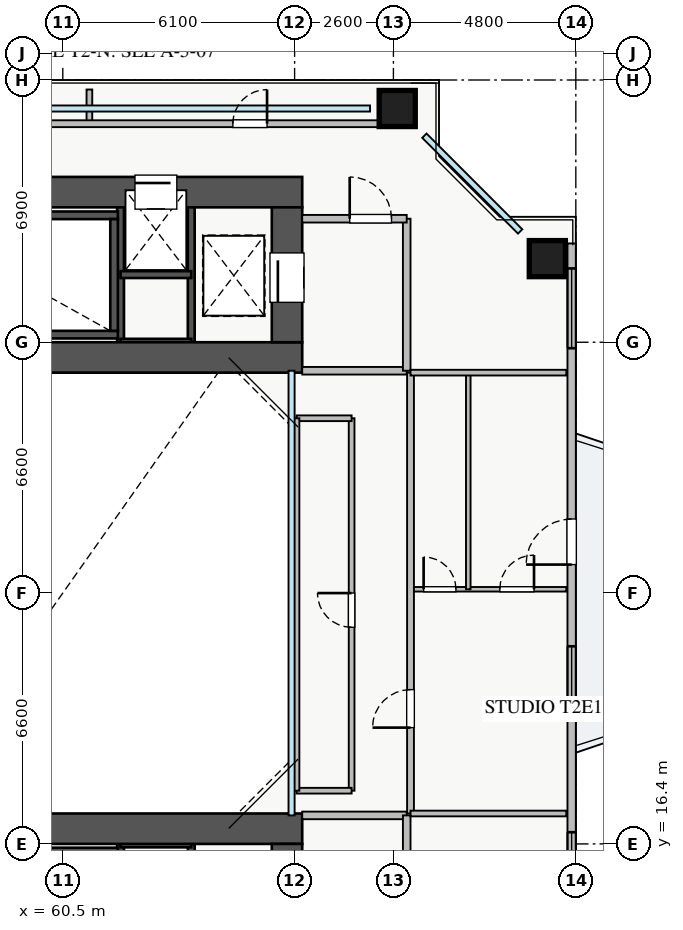
"""IFC4 building model, lengths in metres.
Left out: names, types, materials, properties, quantities, classifications, styles, units other than length and angle.
Written with IfcOpenShell. Run it as: python <this file> out.ifc"""

import sys

from ifc_helpers import new_model, si_unit, direction, frame, frame_2d, origin, origin_2d, place, context, subcontext, project, spatial, rectangle, extrude, source, transform, mapped, element, fill, save


model = new_model("IFC4")
c1 = context("Model", 3, precision=1e-05, world=origin(), true_north=direction((0.0, 1.0)))
c2 = subcontext(c1, "Body", "Model", "MODEL_VIEW")
j1 = project(units=[si_unit("LENGTHUNIT", "METRE"), si_unit("PLANEANGLEUNIT", "RADIAN")], contexts=[c1])
p1 = place(None, origin())
s1 = spatial("IfcSite", under=j1, at=p1, CompositionType="ELEMENT")
p2 = place(p1, origin())
s2 = spatial("IfcBuilding", under=s1, at=p2, CompositionType="ELEMENT")
p3 = place(p2, frame((0.0, 0.0, 26.25)))
s3 = spatial("IfcBuildingStorey", under=s2, at=p3, CompositionType="ELEMENT", Elevation=26.25)
for number, where, z_axis, x_axis in (
    (1, (62.02, 29.6, 0.0), (0.0, 0.0, 1.0), (0.0, 1.0, 0.0)),
    (2, (63.88, 29.6, 0.0), (0.0, 0.0, 1.0), (0.0, 1.0, 0.0)),
):
    element("IfcWall", number, at=place(p3, frame(where, z_axis=z_axis, x_axis=x_axis)), inside=s3, PredefinedType="SHEAR", context=c2, shape_type="SweptSolid", body=[
        extrude(rectangle(XDim=3.95, YDim=0.18, at=frame_2d((1.975, 0.0))), origin(), (0.0, 0.0, 1.0), 3.07),
    ])
for number, where, z_axis, x_axis in (
    (3, (62.02, 31.38, 0.0), (0.0, 0.0, 1.0), (1.0, 0.0, 0.0)),
    (4, (62.02, 29.6, 0.0), (0.0, 0.0, 1.0), (1.0, 0.0, 0.0)),
):
    element("IfcWall", number, at=place(p3, frame(where, z_axis=z_axis, x_axis=x_axis)), inside=s3, PredefinedType="SHEAR", context=c2, shape_type="SweptSolid", body=[
        extrude(rectangle(XDim=1.86, YDim=0.18, at=frame_2d((0.93, 0.0))), origin(), (0.0, 0.0, 1.0), 3.07),
    ])
for number, where, z_axis, x_axis in (
    (5, (62.02, 12.45, 0.0), (0.0, 0.0, 1.0), (0.0, 1.0, 0.0)),
    (6, (63.88, 12.45, 0.0), (0.0, 0.0, 1.0), (0.0, 1.0, 0.0)),
):
    element("IfcWall", number, at=place(p3, frame(where, z_axis=z_axis, x_axis=x_axis)), inside=s3, PredefinedType="SHEAR", context=c2, shape_type="SweptSolid", body=[
        extrude(rectangle(XDim=3.95, YDim=0.18, at=frame_2d((1.975, 0.0))), origin(), (0.0, 0.0, 1.0), 3.07),
    ])
p4 = place(p3, frame((62.02, 16.4, 0.0), z_axis=(0.0, 0.0, 1.0), x_axis=(1.0, 0.0, 0.0)))
e7 = element("IfcWall", 7, at=p4, inside=s3, PredefinedType="SHEAR", context=c2, shape_type="SweptSolid", body=[
    extrude(rectangle(XDim=1.86, YDim=0.18, at=frame_2d((0.93, 0.0))), origin(), (0.0, 0.0, 1.0), 3.07),
])
for number, where, z_axis, x_axis in (
    (8, (54.8, 29.8, 0.0), (0.0, 0.0, 1.0), (1.0, 0.0, 0.0)),
    (9, (54.8, 32.94, 0.0), (0.0, 0.0, 1.0), (1.0, 0.0, 0.0)),
):
    element("IfcWall", number, at=place(p3, frame(where, z_axis=z_axis, x_axis=x_axis)), inside=s3, PredefinedType="SHEAR", context=c2, shape_type="SweptSolid", body=[
        extrude(rectangle(XDim=7.15, YDim=0.2, at=frame_2d((3.575, 0.0))), origin(), (0.0, 0.0, 1.0), 3.25),
    ])
p5 = place(p3, frame((61.85, 29.9, 0.0), z_axis=(0.0, 0.0, 1.0), x_axis=(0.0, 1.0, 0.0)))
e10 = element("IfcWall", 10, at=p5, inside=s3, PredefinedType="SHEAR", context=c2, shape_type="SweptSolid", body=[
    extrude(rectangle(XDim=2.94, YDim=0.2, at=frame_2d((1.47, 0.0))), origin(), (0.0, 0.0, 1.0), 3.25),
])
p6 = place(p3, frame((54.8, 16.2, 0.0), z_axis=(0.0, 0.0, 1.0), x_axis=(1.0, 0.0, 0.0)))
e11 = element("IfcWall", 11, at=p6, inside=s3, PredefinedType="SHEAR", context=c2, shape_type="SweptSolid", body=[
    extrude(rectangle(XDim=7.15, YDim=0.2, at=frame_2d((3.575, 0.0))), origin(), (0.0, 0.0, 1.0), 3.25),
])
p7 = place(p3, frame((54.2, 29.2, 0.0), z_axis=(0.0, 0.0, 1.0), x_axis=(1.0, 0.0, 0.0)))
e12 = element("IfcWall", 12, at=p7, inside=s3, PredefinedType="SHEAR", context=c2, shape_type="SweptSolid", body=[
    extrude(rectangle(XDim=12.6, YDim=0.8, at=frame_2d((6.3, 0.0))), origin(), (0.0, 0.0, 1.0), 3.25),
])
p8 = place(p3, frame((54.2, 33.55, 0.0), z_axis=(0.0, 0.0, 1.0), x_axis=(1.0, 0.0, 0.0)))
e13 = element("IfcWall", 13, at=p8, inside=s3, PredefinedType="SHEAR", context=c2, shape_type="SweptSolid", body=[
    extrude(rectangle(XDim=12.6, YDim=0.8, at=frame_2d((6.3, 0.0))), origin(), (0.0, 0.0, 1.0), 3.25),
])
p9 = place(p8, frame((8.2, 0.0, 0.0)))
e14 = element("IfcOpeningElement", 14, at=p9, cuts=e13, PredefinedType="OPENING", context=c2, shape_type="SweptSolid", body=[
    extrude(rectangle(XDim=1.1, YDim=2.05, at=frame_2d((0.55, 1.025))), frame((0.0, 0.41, 0.0), z_axis=(0.0, -1.0, 0.0), x_axis=(1.0, 0.0, 0.0)), (0.0, 0.0, 1.0), 0.82),
])
p10 = place(p3, frame((66.4, 29.6, 0.0), z_axis=(0.0, 0.0, 1.0), x_axis=(0.0, 1.0, 0.0)))
e15 = element("IfcWall", 15, at=p10, inside=s3, PredefinedType="SHEAR", context=c2, shape_type="SweptSolid", body=[
    extrude(rectangle(XDim=3.55, YDim=0.8, at=frame_2d((1.775, 0.0))), origin(), (0.0, 0.0, 1.0), 3.25),
])
p11 = place(p10, frame((1.05, 0.0, 0.0)))
e16 = element("IfcOpeningElement", 16, at=p11, cuts=e15, PredefinedType="OPENING", context=c2, shape_type="SweptSolid", body=[
    extrude(rectangle(XDim=1.3, YDim=2.05, at=frame_2d((0.65, 1.025))), frame((0.0, 0.41, 0.0), z_axis=(0.0, -1.0, 0.0), x_axis=(1.0, 0.0, 0.0)), (0.0, 0.0, 1.0), 0.82),
])
p12 = place(p3, frame((54.2, 16.8, 0.0), z_axis=(0.0, 0.0, 1.0), x_axis=(1.0, 0.0, 0.0)))
e17 = element("IfcWall", 17, at=p12, inside=s3, PredefinedType="SHEAR", context=c2, shape_type="SweptSolid", body=[
    extrude(rectangle(XDim=12.6, YDim=0.8, at=frame_2d((6.3, 0.0))), origin(), (0.0, 0.0, 1.0), 3.25),
])
p13 = place(p3, frame((66.4, 12.85, 0.0), z_axis=(0.0, 0.0, 1.0), x_axis=(0.0, 1.0, 0.0)))
e18 = element("IfcWall", 18, at=p13, inside=s3, PredefinedType="SHEAR", context=c2, shape_type="SweptSolid", body=[
    extrude(rectangle(XDim=3.55, YDim=0.8, at=frame_2d((1.775, 0.0))), origin(), (0.0, 0.0, 1.0), 3.25),
])
p14 = place(p13, frame((1.05, 0.0, 0.0)))
e19 = element("IfcOpeningElement", 19, at=p14, cuts=e18, PredefinedType="OPENING", context=c2, shape_type="SweptSolid", body=[
    extrude(rectangle(XDim=1.3, YDim=2.05, at=frame_2d((0.65, 1.025))), frame((0.0, 0.41, 0.0), z_axis=(0.0, -1.0, 0.0), x_axis=(1.0, 0.0, 0.0)), (0.0, 0.0, 1.0), 0.82),
])
m1 = source(origin(), c2, "Body", "SweptSolid", [
    extrude(rectangle(XDim=0.95, YDim=0.95, at=origin_2d()), origin(), (0.0, 0.0, 1.0), 3.25),
])
for number, where, z_axis, x_axis in (
    (20, (73.25, 31.8, 0.0), (0.0, 0.0, 1.0), (1.0, 0.0, 0.0)),
    (21, (69.3, 35.75, 0.0), (0.0, 0.0, 1.0), (1.0, 0.0, 0.0)),
):
    element("IfcColumn", number, at=place(p3, frame(where, z_axis=z_axis, x_axis=x_axis)), inside=s3, PredefinedType="COLUMN", context=c2, shape_type="MappedRepresentation", body=[
        mapped(m1, transform((0.0, 0.0, 0.0), x_axis=(1.0, 0.0, 0.0), y_axis=(0.0, 1.0, 0.0), z_axis=(0.0, 0.0, 1.0), scale=1.0)),
    ])
p15 = place(p3, frame((73.89, 13.8, 0.0), z_axis=(0.0, 0.0, 1.0), x_axis=(0.0, 1.0, 0.0)))
e22 = element("IfcWall", 22, at=p15, inside=s3, PredefinedType="STANDARD", context=c2, shape_type="SweptSolid", body=[
    extrude(rectangle(XDim=18.4, YDim=0.22, at=frame_2d((9.2, 0.0))), origin(), (0.0, 0.0, 1.0), 2.61),
])
p16 = place(p15, frame((9.95, 0.0, 0.0)))
e23 = element("IfcOpeningElement", 23, at=p16, cuts=e22, PredefinedType="OPENING", context=c2, shape_type="SweptSolid", body=[
    extrude(rectangle(XDim=1.2, YDim=2.1, at=frame_2d((0.6, 1.05))), frame((0.0, 0.12, 0.0), z_axis=(0.0, -1.0, 0.0), x_axis=(1.0, 0.0, 0.0)), (0.0, 0.0, 1.0), 0.24),
])
p17 = place(p15, frame((0.508, 0.0, 0.9)))
e24 = element("IfcOpeningElement", 24, at=p17, cuts=e22, PredefinedType="OPENING", context=c2, shape_type="SweptSolid", body=[
    extrude(rectangle(XDim=2.4, YDim=1.5, at=frame_2d((1.2, 0.75))), frame((0.0, 0.12, 0.0), z_axis=(0.0, -1.0, 0.0), x_axis=(1.0, 0.0, 0.0)), (0.0, 0.0, 1.0), 0.24),
])
p18 = place(p15, frame((6.0, 0.0, 0.9)))
e25 = element("IfcOpeningElement", 25, at=p18, cuts=e22, PredefinedType="OPENING", context=c2, shape_type="SweptSolid", body=[
    extrude(rectangle(XDim=1.8, YDim=1.45, at=frame_2d((0.9, 0.725))), frame((0.0, 0.12, 0.0), z_axis=(0.0, -1.0, 0.0), x_axis=(1.0, 0.0, 0.0)), (0.0, 0.0, 1.0), 0.24),
])
p19 = place(p15, frame((15.643, 0.0, 0.9)))
e26 = element("IfcOpeningElement", 26, at=p19, cuts=e22, PredefinedType="OPENING", context=c2, shape_type="SweptSolid", body=[
    extrude(rectangle(XDim=2.1, YDim=1.5, at=frame_2d((1.05, 0.75))), frame((0.0, 0.12, 0.0), z_axis=(0.0, -1.0, 0.0), x_axis=(1.0, 0.0, 0.0)), (0.0, 0.0, 1.0), 0.24),
])
p20 = place(p3, frame((66.8, 28.85, 0.0), z_axis=(0.0, 0.0, 1.0), x_axis=(1.0, 0.0, 0.0)))
e27 = element("IfcWall", 27, at=p20, inside=s3, PredefinedType="PARTITIONING", context=c2, shape_type="SweptSolid", body=[
    extrude(rectangle(XDim=2.75, YDim=0.2, at=frame_2d((1.375, 0.0))), origin(), (0.0, 0.0, 1.0), 3.07),
])
p21 = place(p3, frame((69.55, 28.85, 0.0), z_axis=(0.0, 0.0, 1.0), x_axis=(0.0, 1.0, 0.0)))
e28 = element("IfcWall", 28, at=p21, inside=s3, PredefinedType="PARTITIONING", context=c2, shape_type="SweptSolid", body=[
    extrude(rectangle(XDim=4.0, YDim=0.2, at=frame_2d((2.0, 0.0))), origin(), (0.0, 0.0, 1.0), 2.615),
])
p22 = place(p3, frame((66.8, 32.85, 0.0), z_axis=(0.0, 0.0, 1.0), x_axis=(1.0, 0.0, 0.0)))
e29 = element("IfcWall", 29, at=p22, inside=s3, PredefinedType="PARTITIONING", context=c2, shape_type="SweptSolid", body=[
    extrude(rectangle(XDim=2.75, YDim=0.2, at=frame_2d((1.375, 0.0))), origin(), (0.0, 0.0, 1.0), 3.07),
])
p23 = place(p22, frame((1.25, 0.0, 0.0)))
e30 = element("IfcOpeningElement", 30, at=p23, cuts=e29, PredefinedType="OPENING", context=c2, shape_type="SweptSolid", body=[
    extrude(rectangle(XDim=1.1, YDim=2.05, at=frame_2d((0.55, 1.025))), frame((0.0, 0.11, 0.0), z_axis=(0.0, -1.0, 0.0), x_axis=(1.0, 0.0, 0.0)), (0.0, 0.0, 1.0), 0.22),
])
p24 = place(p3, frame((66.8, 17.15, 0.0), z_axis=(0.0, 0.0, 1.0), x_axis=(1.0, 0.0, 0.0)))
e31 = element("IfcWall", 31, at=p24, inside=s3, PredefinedType="PARTITIONING", context=c2, shape_type="SweptSolid", body=[
    extrude(rectangle(XDim=2.75, YDim=0.2, at=frame_2d((1.375, 0.0))), origin(), (0.0, 0.0, 1.0), 3.07),
])
p25 = place(p3, frame((69.55, 13.15, 0.0), z_axis=(0.0, 0.0, 1.0), x_axis=(0.0, 1.0, 0.0)))
e32 = element("IfcWall", 32, at=p25, inside=s3, PredefinedType="PARTITIONING", context=c2, shape_type="SweptSolid", body=[
    extrude(rectangle(XDim=4.0, YDim=0.2, at=frame_2d((2.0, 0.0))), origin(), (0.0, 0.0, 1.0), 2.615),
])
p26 = place(p3, frame((69.65, 23.1, 0.0), z_axis=(0.0, 0.0, 1.0), x_axis=(1.0, 0.0, 0.0)))
e33 = element("IfcWall", 33, at=p26, inside=s3, PredefinedType="PLUMBINGWALL", context=c2, shape_type="SweptSolid", body=[
    extrude(rectangle(XDim=4.1, YDim=0.12, at=frame_2d((2.05, 0.0))), origin(), (0.0, 0.0, 1.0), 2.815),
])
p27 = place(p26, frame((0.345, 0.0, 0.0)))
e34 = element("IfcOpeningElement", 34, at=p27, cuts=e33, PredefinedType="OPENING", context=c2, shape_type="SweptSolid", body=[
    extrude(rectangle(XDim=0.85, YDim=2.05, at=frame_2d((0.425, 1.025))), frame((0.0, 0.07, 0.0), z_axis=(0.0, -1.0, 0.0), x_axis=(1.0, 0.0, 0.0)), (0.0, 0.0, 1.0), 0.14),
])
p28 = place(p26, frame((2.35, 0.0, 0.0)))
e35 = element("IfcOpeningElement", 35, at=p28, cuts=e33, PredefinedType="OPENING", context=c2, shape_type="SweptSolid", body=[
    extrude(rectangle(XDim=0.9, YDim=2.05, at=frame_2d((0.45, 1.025))), frame((0.0, 0.07, 0.0), z_axis=(0.0, -1.0, 0.0), x_axis=(1.0, 0.0, 0.0)), (0.0, 0.0, 1.0), 0.14),
])
p29 = place(p3, frame((71.17, 23.1, 0.0), z_axis=(0.0, 0.0, 1.0), x_axis=(0.0, 1.0, 0.0)))
e36 = element("IfcWall", 36, at=p29, inside=s3, PredefinedType="PLUMBINGWALL", context=c2, shape_type="SweptSolid", body=[
    extrude(rectangle(XDim=5.7, YDim=0.12, at=frame_2d((2.85, 0.0))), origin(), (0.0, 0.0, 1.0), 3.07),
])
p30 = place(p3, frame((69.65, 17.2, 0.0), z_axis=(0.0, 0.0, 1.0), x_axis=(0.0, 1.0, 0.0)))
e37 = element("IfcWall", 37, at=p30, inside=s3, PredefinedType="PARTITIONING", context=c2, shape_type="SweptSolid", body=[
    extrude(rectangle(XDim=11.6, YDim=0.18, at=frame_2d((5.8, 0.0))), origin(), (0.0, 0.0, 1.0), 3.07),
])
p31 = place(p30, frame((2.26, 0.0, 0.0)))
e38 = element("IfcOpeningElement", 38, at=p31, cuts=e37, PredefinedType="OPENING", context=c2, shape_type="SweptSolid", body=[
    extrude(rectangle(XDim=1.0, YDim=2.05, at=frame_2d((0.5, 1.025))), frame((0.0, 0.1, 0.0), z_axis=(0.0, -1.0, 0.0), x_axis=(1.0, 0.0, 0.0)), (0.0, 0.0, 1.0), 0.2),
])
for number, where, z_axis, x_axis in (
    (39, (69.65, 17.2, 0.0), (0.0, 0.0, 1.0), (1.0, 0.0, 0.0)),
    (40, (69.65, 28.8, 0.0), (0.0, 0.0, 1.0), (1.0, 0.0, 0.0)),
):
    element("IfcWall", number, at=place(p3, frame(where, z_axis=z_axis, x_axis=x_axis)), inside=s3, PredefinedType="PARTITIONING", context=c2, shape_type="SweptSolid", body=[
        extrude(rectangle(XDim=4.1, YDim=0.15, at=frame_2d((2.05, 0.0))), origin(), (0.0, 0.0, 1.0), 3.07),
    ])
p32 = place(p3, frame((68.1, 17.8, 0.0), z_axis=(0.0, 0.0, 1.0), x_axis=(0.0, 1.0, 0.0)))
e41 = element("IfcWall", 41, at=p32, inside=s3, PredefinedType="PARTITIONING", context=c2, shape_type="SweptSolid", body=[
    extrude(rectangle(XDim=9.8, YDim=0.15, at=frame_2d((4.9, 0.0))), origin(), (0.0, 0.0, 1.0), 3.07),
])
p33 = place(p32, frame((4.3, 0.0, 0.0)))
e42 = element("IfcOpeningElement", 42, at=p33, cuts=e41, PredefinedType="OPENING", context=c2, shape_type="SweptSolid", body=[
    extrude(rectangle(XDim=0.9, YDim=2.05, at=frame_2d((0.45, 1.025))), frame((0.0, 0.085, 0.0), z_axis=(0.0, -1.0, 0.0), x_axis=(1.0, 0.0, 0.0)), (0.0, 0.0, 1.0), 0.17),
])
p34 = place(p3, frame((66.65, 27.6, 0.0), z_axis=(0.0, 0.0, 1.0), x_axis=(1.0, 0.0, 0.0)))
e43 = element("IfcWall", 43, at=p34, inside=s3, PredefinedType="PARTITIONING", context=c2, shape_type="SweptSolid", body=[
    extrude(rectangle(XDim=1.45, YDim=0.15, at=frame_2d((0.725, 0.0))), origin(), (0.0, 0.0, 1.0), 2.815),
])
p35 = place(p3, frame((66.65, 17.8, 0.0), z_axis=(0.0, 0.0, 1.0), x_axis=(1.0, 0.0, 0.0)))
e44 = element("IfcWall", 44, at=p35, inside=s3, PredefinedType="PARTITIONING", context=c2, shape_type="SweptSolid", body=[
    extrude(rectangle(XDim=1.45, YDim=0.15, at=frame_2d((0.725, 0.0))), origin(), (0.0, 0.0, 1.0), 3.07),
])
p36 = place(p3, frame((66.65, 17.8, 0.0), z_axis=(0.0, 0.0, 1.0), x_axis=(0.0, 1.0, 0.0)))
e45 = element("IfcWall", 45, at=p36, inside=s3, PredefinedType="PARTITIONING", context=c2, shape_type="SweptSolid", body=[
    extrude(rectangle(XDim=9.8, YDim=0.15, at=frame_2d((4.9, 0.0))), origin(), (0.0, 0.0, 1.0), 2.665),
])
for number, where, z_axis, x_axis in (
    (46, (61.2, 35.35, 0.0), (0.0, 0.0, 1.0), (0.0, 1.0, 0.0)),
    (47, (69.65, 35.35, 0.0), (0.0, 0.0, 1.0), (0.0, 1.0, 0.0)),
):
    element("IfcWall", number, at=place(p3, frame(where, z_axis=z_axis, x_axis=x_axis)), inside=s3, PredefinedType="PARTITIONING", context=c2, shape_type="SweptSolid", body=[
        extrude(rectangle(XDim=0.9, YDim=0.15, at=frame_2d((0.45, 0.0))), origin(), (0.0, 0.0, 1.0), 3.07),
    ])
p37 = place(p3, frame((52.65, 35.35, 0.0), z_axis=(0.0, 0.0, 1.0), x_axis=(1.0, 0.0, 0.0)))
e48 = element("IfcWall", 48, at=p37, inside=s3, PredefinedType="PARTITIONING", context=c2, shape_type="SweptSolid", body=[
    extrude(rectangle(XDim=17.0, YDim=0.18, at=frame_2d((8.5, 0.0))), origin(), (0.0, 0.0, 1.0), 3.07),
])
p38 = place(p37, frame((3.825, 0.0, 0.0)))
e49 = element("IfcOpeningElement", 49, at=p38, cuts=e48, PredefinedType="OPENING", context=c2, shape_type="SweptSolid", body=[
    extrude(rectangle(XDim=0.9, YDim=2.05, at=frame_2d((0.45, 1.025))), frame((0.0, 0.1, 0.0), z_axis=(0.0, -1.0, 0.0), x_axis=(1.0, 0.0, 0.0)), (0.0, 0.0, 1.0), 0.2),
])
p39 = place(p37, frame((12.325, 0.0, 0.0)))
e50 = element("IfcOpeningElement", 50, at=p39, cuts=e48, PredefinedType="OPENING", context=c2, shape_type="SweptSolid", body=[
    extrude(rectangle(XDim=0.9, YDim=2.05, at=frame_2d((0.45, 1.025))), frame((0.0, 0.1, 0.0), z_axis=(0.0, -1.0, 0.0), x_axis=(1.0, 0.0, 0.0)), (0.0, 0.0, 1.0), 0.2),
])
m2 = source(origin(), c2, "Body", "SweptSolid", [
    extrude(rectangle(XDim=1.2, YDim=2.1, at=frame_2d((0.6, 1.05))), frame((0.0, 0.025, 0.0), z_axis=(0.0, -1.0, 0.0), x_axis=(1.0, 0.0, 0.0)), (0.0, 0.0, 1.0), 0.05),
])
p40 = place(p16, origin())
e51 = element("IfcDoor", 51, at=p40, inside=s3, OperationType="SINGLE_SWING_LEFT", PredefinedType="DOOR", context=c2, shape_type="MappedRepresentation", body=[
    mapped(m2, transform((0.0, 0.0, 0.0), x_axis=(1.0, 0.0, 0.0), y_axis=(0.0, 1.0, 0.0), z_axis=(0.0, 0.0, 1.0), scale=1.0)),
])
fill(e23, e51)
m3 = source(origin(), c2, "Body", "SweptSolid", [
    extrude(rectangle(XDim=2.4, YDim=1.5, at=frame_2d((1.2, 0.75))), frame((0.0, 0.03, 0.0), z_axis=(0.0, -1.0, 0.0), x_axis=(1.0, 0.0, 0.0)), (0.0, 0.0, 1.0), 0.06),
])
p41 = place(p17, origin())
e52 = element("IfcWindow", 52, at=p41, inside=s3, PartitioningType="TRIPLE_PANEL_VERTICAL", PredefinedType="WINDOW", context=c2, shape_type="MappedRepresentation", body=[
    mapped(m3, transform((0.0, 0.0, 0.0), x_axis=(1.0, 0.0, 0.0), y_axis=(0.0, 1.0, 0.0), z_axis=(0.0, 0.0, 1.0), scale=1.0)),
])
fill(e24, e52)
m4 = source(origin(), c2, "Body", "SweptSolid", [
    extrude(rectangle(XDim=1.8, YDim=1.45, at=frame_2d((0.9, 0.725))), frame((0.0, 0.03, 0.0), z_axis=(0.0, -1.0, 0.0), x_axis=(1.0, 0.0, 0.0)), (0.0, 0.0, 1.0), 0.06),
])
p42 = place(p18, origin())
e53 = element("IfcWindow", 53, at=p42, inside=s3, PartitioningType="DOUBLE_PANEL_VERTICAL", PredefinedType="WINDOW", context=c2, shape_type="MappedRepresentation", body=[
    mapped(m4, transform((0.0, 0.0, 0.0), x_axis=(1.0, 0.0, 0.0), y_axis=(0.0, 1.0, 0.0), z_axis=(0.0, 0.0, 1.0), scale=1.0)),
])
fill(e25, e53)
m5 = source(origin(), c2, "Body", "SweptSolid", [
    extrude(rectangle(XDim=2.1, YDim=1.5, at=frame_2d((1.05, 0.75))), frame((0.0, 0.03, 0.0), z_axis=(0.0, -1.0, 0.0), x_axis=(1.0, 0.0, 0.0)), (0.0, 0.0, 1.0), 0.06),
])
p43 = place(p19, origin())
e54 = element("IfcWindow", 54, at=p43, inside=s3, PartitioningType="TRIPLE_PANEL_VERTICAL", PredefinedType="WINDOW", context=c2, shape_type="MappedRepresentation", body=[
    mapped(m5, transform((0.0, 0.0, 0.0), x_axis=(1.0, 0.0, 0.0), y_axis=(0.0, 1.0, 0.0), z_axis=(0.0, 0.0, 1.0), scale=1.0)),
])
fill(e26, e54)
m6 = source(origin(), c2, "Body", "SweptSolid", [
    extrude(rectangle(XDim=1.3, YDim=2.05, at=frame_2d((0.65, 1.025))), frame((0.0, 0.025, 0.0), z_axis=(0.0, -1.0, 0.0), x_axis=(1.0, 0.0, 0.0)), (0.0, 0.0, 1.0), 0.05),
])
p44 = place(p11, origin())
e55 = element("IfcDoor", 55, at=p44, inside=s3, OperationType="SLIDING_TO_LEFT", PredefinedType="DOOR", context=c2, shape_type="MappedRepresentation", body=[
    mapped(m6, transform((0.0, 0.0, 0.0), x_axis=(1.0, 0.0, 0.0), y_axis=(0.0, 1.0, 0.0), z_axis=(0.0, 0.0, 1.0), scale=1.0)),
])
fill(e16, e55)
m7 = source(origin(), c2, "Body", "SweptSolid", [
    extrude(rectangle(XDim=1.1, YDim=2.05, at=frame_2d((0.55, 1.025))), frame((0.0, 0.025, 0.0), z_axis=(0.0, -1.0, 0.0), x_axis=(1.0, 0.0, 0.0)), (0.0, 0.0, 1.0), 0.05),
])
p45 = place(p9, origin())
e56 = element("IfcDoor", 56, at=p45, inside=s3, OperationType="SLIDING_TO_LEFT", PredefinedType="DOOR", context=c2, shape_type="MappedRepresentation", body=[
    mapped(m7, transform((0.0, 0.0, 0.0), x_axis=(1.0, 0.0, 0.0), y_axis=(0.0, 1.0, 0.0), z_axis=(0.0, 0.0, 1.0), scale=1.0)),
])
fill(e14, e56)
p46 = place(p23, origin())
e57 = element("IfcDoor", 57, at=p46, inside=s3, OperationType="SINGLE_SWING_LEFT", PredefinedType="DOOR", context=c2, shape_type="MappedRepresentation", body=[
    mapped(m7, transform((0.0, 0.0, 0.0), x_axis=(1.0, 0.0, 0.0), y_axis=(0.0, 1.0, 0.0), z_axis=(0.0, 0.0, 1.0), scale=1.0)),
])
fill(e30, e57)
m8 = source(origin(), c2, "Body", "SweptSolid", [
    extrude(rectangle(XDim=0.85, YDim=2.05, at=frame_2d((0.425, 1.025))), frame((0.0, 0.025, 0.0), z_axis=(0.0, -1.0, 0.0), x_axis=(1.0, 0.0, 0.0)), (0.0, 0.0, 1.0), 0.05),
])
p47 = place(p27, origin())
e58 = element("IfcDoor", 58, at=p47, inside=s3, OperationType="SINGLE_SWING_LEFT", PredefinedType="DOOR", context=c2, shape_type="MappedRepresentation", body=[
    mapped(m8, transform((0.0, 0.0, 0.0), x_axis=(1.0, 0.0, 0.0), y_axis=(0.0, 1.0, 0.0), z_axis=(0.0, 0.0, 1.0), scale=1.0)),
])
fill(e34, e58)
m9 = source(origin(), c2, "Body", "SweptSolid", [
    extrude(rectangle(XDim=0.9, YDim=2.05, at=frame_2d((0.45, 1.025))), frame((0.0, 0.025, 0.0), z_axis=(0.0, -1.0, 0.0), x_axis=(1.0, 0.0, 0.0)), (0.0, 0.0, 1.0), 0.05),
])
p48 = place(p28, origin())
e59 = element("IfcDoor", 59, at=p48, inside=s3, OperationType="SINGLE_SWING_RIGHT", PredefinedType="DOOR", context=c2, shape_type="MappedRepresentation", body=[
    mapped(m9, transform((0.0, 0.0, 0.0), x_axis=(1.0, 0.0, 0.0), y_axis=(0.0, 1.0, 0.0), z_axis=(0.0, 0.0, 1.0), scale=1.0)),
])
fill(e35, e59)
m10 = source(origin(), c2, "Body", "SweptSolid", [
    extrude(rectangle(XDim=1.0, YDim=2.05, at=frame_2d((0.5, 1.025))), frame((0.0, 0.025, 0.0), z_axis=(0.0, -1.0, 0.0), x_axis=(1.0, 0.0, 0.0)), (0.0, 0.0, 1.0), 0.05),
])
p49 = place(p31, origin())
e60 = element("IfcDoor", 60, at=p49, inside=s3, OperationType="SINGLE_SWING_LEFT", PredefinedType="DOOR", context=c2, shape_type="MappedRepresentation", body=[
    mapped(m10, transform((0.0, 0.0, 0.0), x_axis=(1.0, 0.0, 0.0), y_axis=(0.0, 1.0, 0.0), z_axis=(0.0, 0.0, 1.0), scale=1.0)),
])
fill(e38, e60)
p50 = place(p33, origin())
e61 = element("IfcDoor", 61, at=p50, inside=s3, OperationType="SINGLE_SWING_RIGHT", PredefinedType="DOOR", context=c2, shape_type="MappedRepresentation", body=[
    mapped(m9, transform((0.0, 0.0, 0.0), x_axis=(1.0, 0.0, 0.0), y_axis=(0.0, 1.0, 0.0), z_axis=(0.0, 0.0, 1.0), scale=1.0)),
])
fill(e42, e61)
p51 = place(p39, origin())
e62 = element("IfcDoor", 62, at=p51, inside=s3, OperationType="SINGLE_SWING_RIGHT", PredefinedType="DOOR", context=c2, shape_type="MappedRepresentation", body=[
    mapped(m9, transform((0.0, 0.0, 0.0), x_axis=(1.0, 0.0, 0.0), y_axis=(0.0, 1.0, 0.0), z_axis=(0.0, 0.0, 1.0), scale=1.0)),
])
fill(e50, e62)
save(model, sys.argv[1])
